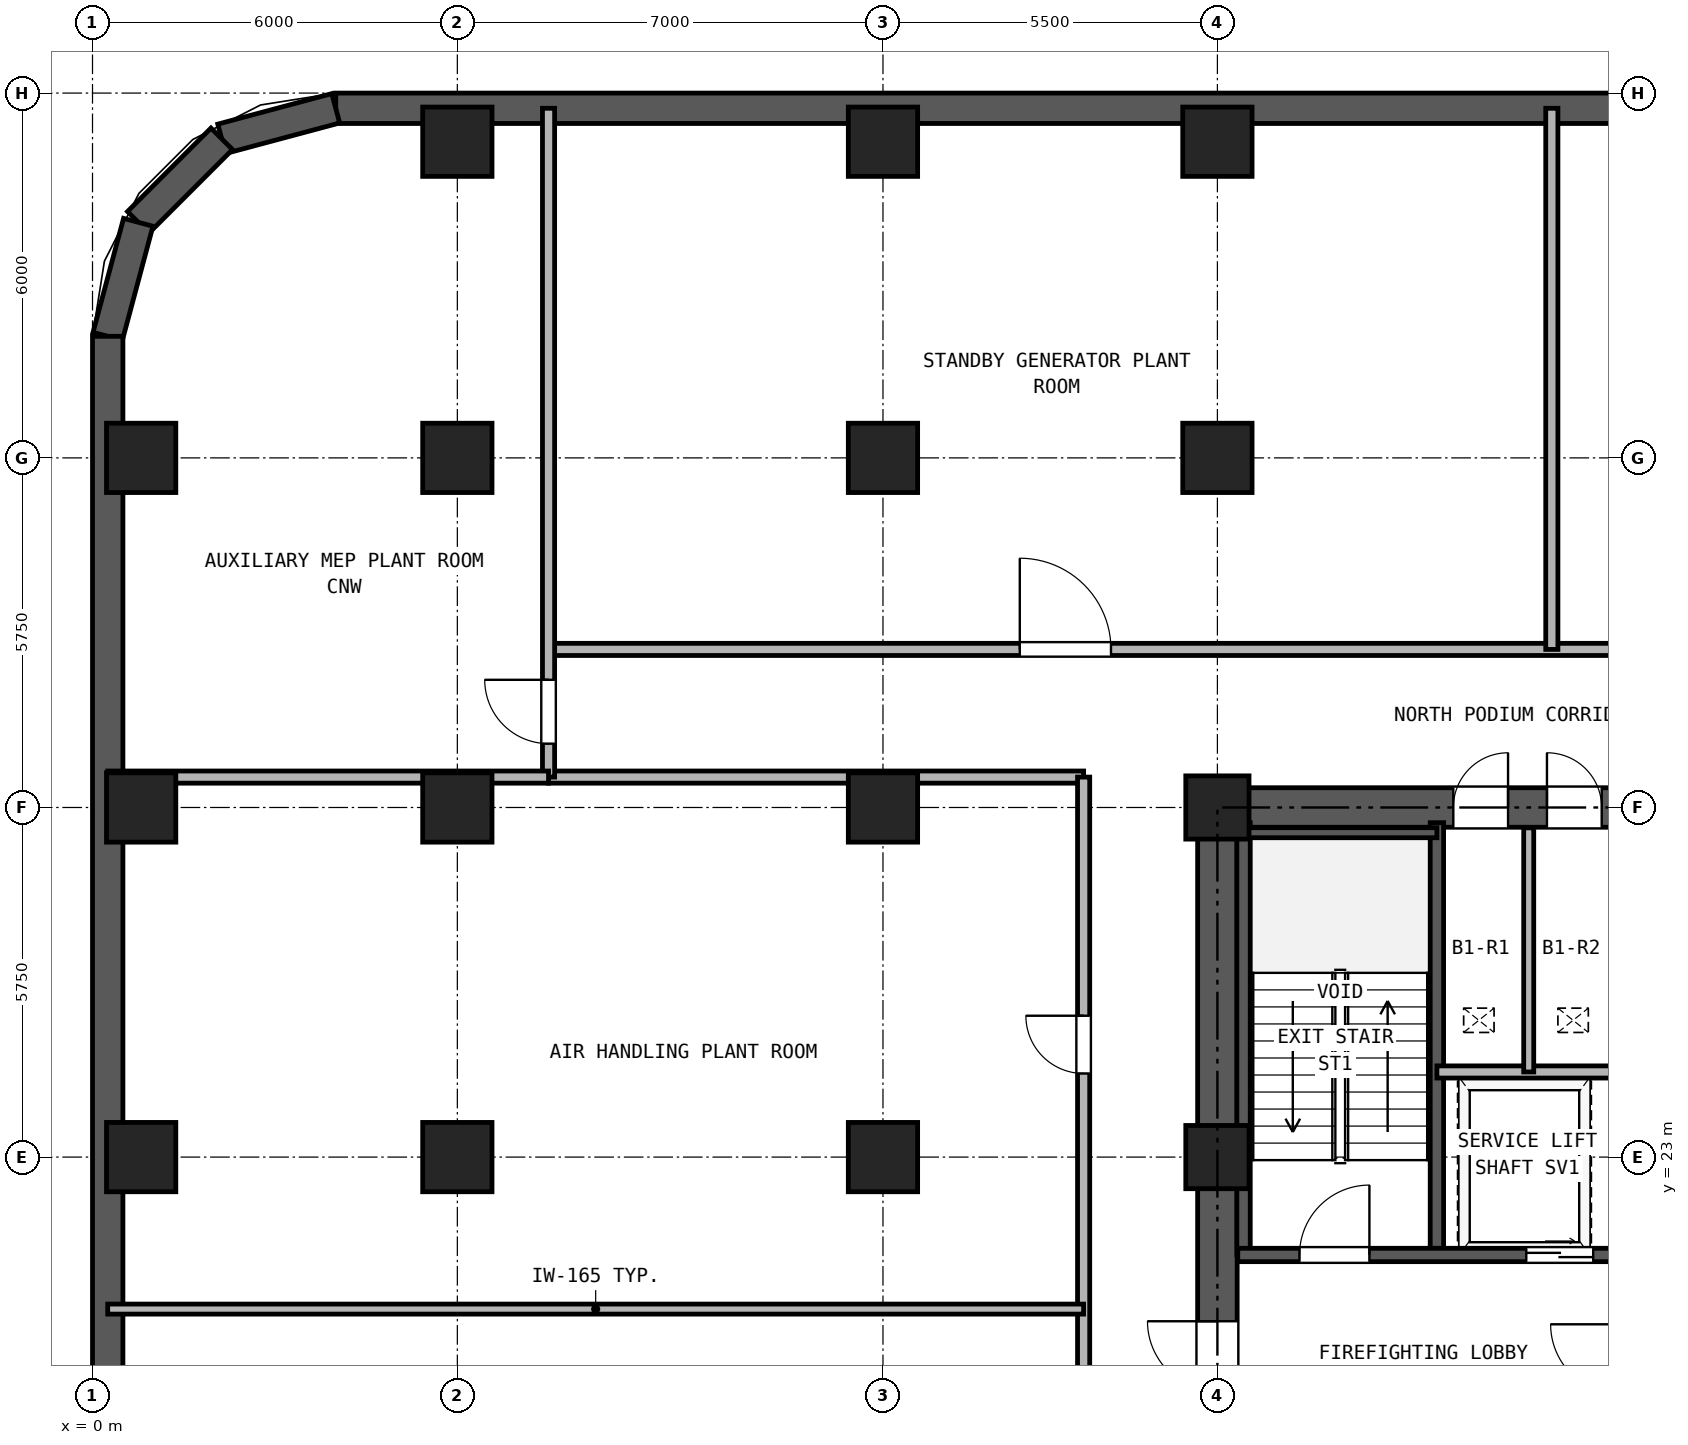
"""IFC4 building model, lengths in metres.
Left out: names, types, materials, properties, quantities, classifications, styles, units other than length and angle.
Written with IfcOpenShell. Run it as: python <this file> out.ifc"""

import sys

from ifc_helpers import new_model, si_unit, direction, frame, frame_2d, origin, origin_2d, place, context, subcontext, project, spatial, rectangle, hollow_rectangle, extrude, source, transform, mapped, element, fill, save


model = new_model("IFC4")
c1 = context("Model", 3, precision=1e-05, world=origin(), true_north=direction((0.0, 1.0)))
c2 = subcontext(c1, "Body", "Model", "MODEL_VIEW")
j1 = project(units=[si_unit("LENGTHUNIT", "METRE"), si_unit("PLANEANGLEUNIT", "RADIAN")], contexts=[c1])
p1 = place(None, origin())
s1 = spatial("IfcSite", under=j1, at=p1, CompositionType="ELEMENT")
p2 = place(p1, origin())
s2 = spatial("IfcBuilding", under=s1, at=p2, CompositionType="ELEMENT")
p3 = place(p2, frame((0.0, 0.0, -4.2)))
s3 = spatial("IfcBuildingStorey", under=s2, at=p3, CompositionType="ELEMENT", Elevation=-4.2)
m1 = source(origin(), c2, "Body", "SweptSolid", [
    extrude(hollow_rectangle(XDim=1.14, YDim=1.14, WallThickness=0.07, at=origin_2d()), origin(), (0.0, 0.0, 1.0), 3.88),
])
for number, where, z_axis, x_axis in (
    (1, (6.0, 39.7, 0.0), (0.0, 0.0, 1.0), (1.0, 0.0, 0.0)),
    (2, (13.0, 39.7, 0.0), (0.0, 0.0, 1.0), (1.0, 0.0, 0.0)),
    (3, (18.5, 39.7, 0.0), (0.0, 0.0, 1.0), (1.0, 0.0, 0.0)),
    (4, (0.8, 23.0, 0.0), (0.0, 0.0, 1.0), (1.0, 0.0, 0.0)),
    (5, (0.8, 28.75, 0.0), (0.0, 0.0, 1.0), (1.0, 0.0, 0.0)),
    (6, (0.8, 34.5, 0.0), (0.0, 0.0, 1.0), (1.0, 0.0, 0.0)),
    (7, (6.0, 23.0, 0.0), (0.0, 0.0, 1.0), (1.0, 0.0, 0.0)),
    (8, (6.0, 28.75, 0.0), (0.0, 0.0, 1.0), (1.0, 0.0, 0.0)),
    (9, (6.0, 34.5, 0.0), (0.0, 0.0, 1.0), (1.0, 0.0, 0.0)),
    (10, (13.0, 23.0, 0.0), (0.0, 0.0, 1.0), (1.0, 0.0, 0.0)),
    (11, (13.0, 28.75, 0.0), (0.0, 0.0, 1.0), (1.0, 0.0, 0.0)),
    (12, (13.0, 34.5, 0.0), (0.0, 0.0, 1.0), (1.0, 0.0, 0.0)),
):
    element("IfcColumn", number, at=place(p3, frame(where, z_axis=z_axis, x_axis=x_axis)), inside=s3, PredefinedType="COLUMN", context=c2, shape_type="MappedRepresentation", body=[
        mapped(m1, transform((0.0, 0.0, 0.0), x_axis=(1.0, 0.0, 0.0), y_axis=(0.0, 1.0, 0.0), z_axis=(0.0, 0.0, 1.0), scale=1.0)),
    ])
m2 = source(origin(), c2, "Body", "SweptSolid", [
    extrude(hollow_rectangle(XDim=1.04, YDim=1.04, WallThickness=0.065, at=origin_2d()), origin(), (0.0, 0.0, 1.0), 3.88),
])
for number, where, z_axis, x_axis in (
    (13, (18.5, 23.0, 0.0), (0.0, 0.0, 1.0), (1.0, 0.0, 0.0)),
    (14, (18.5, 28.75, 0.0), (0.0, 0.0, 1.0), (1.0, 0.0, 0.0)),
):
    element("IfcColumn", number, at=place(p3, frame(where, z_axis=z_axis, x_axis=x_axis)), inside=s3, PredefinedType="COLUMN", context=c2, shape_type="MappedRepresentation", body=[
        mapped(m2, transform((0.0, 0.0, 0.0), x_axis=(1.0, 0.0, 0.0), y_axis=(0.0, 1.0, 0.0), z_axis=(0.0, 0.0, 1.0), scale=1.0)),
    ])
p4 = place(p3, frame((18.5, 34.5, 0.0), z_axis=(0.0, 0.0, 1.0), x_axis=(1.0, 0.0, 0.0)))
e15 = element("IfcColumn", 15, at=p4, inside=s3, PredefinedType="COLUMN", context=c2, shape_type="MappedRepresentation", body=[
    mapped(m1, transform((0.0, 0.0, 0.0), x_axis=(1.0, 0.0, 0.0), y_axis=(0.0, 1.0, 0.0), z_axis=(0.0, 0.0, 1.0), scale=1.0)),
])
p5 = place(p3, frame((43.0, 40.25, 0.0), z_axis=(0.0, 0.0, 1.0), x_axis=(-1.0, 0.0, 0.0)))
e16 = element("IfcWall", 16, at=p5, inside=s3, PredefinedType="USERDEFINED", context=c2, shape_type="SweptSolid", body=[
    extrude(rectangle(XDim=39.0, YDim=0.5, at=frame_2d((19.5, 0.0))), origin(), (0.0, 0.0, 1.0), 3.88),
])
for number, where, z_axis, x_axis in (
    (17, (4.0, 40.25, 0.0), (0.0, 0.0, 1.0), (-0.966, -0.259, 0.0)),
    (18, (2.125, 39.748, 0.0), (0.0, 0.0, 1.0), (-0.707, -0.707, 0.0)),
    (19, (0.752, 38.375, 0.0), (0.0, 0.0, 1.0), (-0.259, -0.966, 0.0)),
):
    element("IfcWall", number, at=place(p3, frame(where, z_axis=z_axis, x_axis=x_axis)), inside=s3, PredefinedType="USERDEFINED", context=c2, shape_type="SweptSolid", body=[
        extrude(rectangle(XDim=1.941, YDim=0.5, at=frame_2d((0.971, 0.0))), origin(), (0.0, 0.0, 1.0), 3.88),
    ])
p6 = place(p3, frame((0.25, 36.5, 0.0), z_axis=(0.0, 0.0, 1.0), x_axis=(0.0, -1.0, 0.0)))
e20 = element("IfcWall", 20, at=p6, inside=s3, PredefinedType="USERDEFINED", context=c2, shape_type="SweptSolid", body=[
    extrude(rectangle(XDim=32.5, YDim=0.5, at=frame_2d((16.25, 0.0))), origin(), (0.0, 0.0, 1.0), 3.88),
])
p7 = place(p3, frame((18.175, 28.75, 0.0), z_axis=(0.0, 0.0, 1.0), x_axis=(1.0, 0.0, 0.0)))
e21 = element("IfcWall", 21, at=p7, inside=s3, PredefinedType="SHEAR", context=c2, shape_type="SweptSolid", body=[
    extrude(rectangle(XDim=10.65, YDim=0.65, at=frame_2d((5.325, 0.0))), origin(), (0.0, 0.0, 1.0), 3.88),
])
p8 = place(p7, frame((4.205, 0.0, 0.0)))
e22 = element("IfcOpeningElement", 22, at=p8, cuts=e21, PredefinedType="OPENING", context=c2, shape_type="SweptSolid", body=[
    extrude(rectangle(XDim=0.9, YDim=2.05, at=frame_2d((0.45, 1.025))), frame((0.0, 0.335, 0.0), z_axis=(0.0, -1.0, 0.0), x_axis=(1.0, 0.0, 0.0)), (0.0, 0.0, 1.0), 0.67),
])
p9 = place(p7, frame((5.745, 0.0, 0.0)))
e23 = element("IfcOpeningElement", 23, at=p9, cuts=e21, PredefinedType="OPENING", context=c2, shape_type="SweptSolid", body=[
    extrude(rectangle(XDim=0.9, YDim=2.05, at=frame_2d((0.45, 1.025))), frame((0.0, 0.335, 0.0), z_axis=(0.0, -1.0, 0.0), x_axis=(1.0, 0.0, 0.0)), (0.0, 0.0, 1.0), 0.67),
])
p10 = place(p3, frame((18.5, 11.825, 0.0), z_axis=(0.0, 0.0, 1.0), x_axis=(0.0, 1.0, 0.0)))
e24 = element("IfcWall", 24, at=p10, inside=s3, PredefinedType="SHEAR", context=c2, shape_type="SweptSolid", body=[
    extrude(rectangle(XDim=16.6, YDim=0.65, at=frame_2d((8.3, 0.0))), origin(), (0.0, 0.0, 1.0), 3.88),
])
p11 = place(p10, frame((7.325, 0.0, 0.0)))
e25 = element("IfcOpeningElement", 25, at=p11, cuts=e24, PredefinedType="OPENING", context=c2, shape_type="SweptSolid", body=[
    extrude(rectangle(XDim=1.15, YDim=2.2, at=frame_2d((0.575, 1.1))), frame((0.0, 0.335, 0.0), z_axis=(0.0, -1.0, 0.0), x_axis=(1.0, 0.0, 0.0)), (0.0, 0.0, 1.0), 0.67),
])
for number, where, z_axis, x_axis in (
    (26, (18.93, 21.39, 0.0), (0.0, 0.0, 1.0), (0.0, 1.0, 0.0)),
    (27, (22.11, 21.39, 0.0), (0.0, 0.0, 1.0), (0.0, 1.0, 0.0)),
):
    element("IfcWall", number, at=place(p3, frame(where, z_axis=z_axis, x_axis=x_axis)), inside=s3, PredefinedType="SOLIDWALL", context=c2, shape_type="SweptSolid", body=[
        extrude(rectangle(XDim=7.11, YDim=0.22, at=frame_2d((3.555, 0.0))), origin(), (0.0, 0.0, 1.0), 3.88),
    ])
p12 = place(p3, frame((18.835, 28.335, 0.0), z_axis=(0.0, 0.0, 1.0), x_axis=(1.0, 0.0, 0.0)))
e28 = element("IfcWall", 28, at=p12, inside=s3, PredefinedType="PARTITIONING", context=c2, shape_type="SweptSolid", body=[
    extrude(rectangle(XDim=3.275, YDim=0.165, at=frame_2d((1.638, 0.0))), origin(), (0.0, 0.0, 1.0), 3.88),
])
p13 = place(p3, frame((18.835, 21.39, 0.0), z_axis=(0.0, 0.0, 1.0), x_axis=(1.0, 0.0, 0.0)))
e29 = element("IfcWall", 29, at=p13, inside=s3, PredefinedType="SOLIDWALL", context=c2, shape_type="SweptSolid", body=[
    extrude(rectangle(XDim=6.295, YDim=0.22, at=frame_2d((3.147, 0.0))), origin(), (0.0, 0.0, 1.0), 3.88),
])
p14 = place(p13, frame((1.015, 0.0, 0.0)))
e30 = element("IfcOpeningElement", 30, at=p14, cuts=e29, PredefinedType="OPENING", context=c2, shape_type="SweptSolid", body=[
    extrude(rectangle(XDim=1.15, YDim=2.2, at=frame_2d((0.575, 1.1))), frame((0.0, 0.12, 0.0), z_axis=(0.0, -1.0, 0.0), x_axis=(1.0, 0.0, 0.0)), (0.0, 0.0, 1.0), 0.24),
])
p15 = place(p13, frame((4.745, 0.0, 0.0)))
e31 = element("IfcOpeningElement", 31, at=p15, cuts=e29, PredefinedType="OPENING", context=c2, shape_type="SweptSolid", body=[
    extrude(rectangle(XDim=1.1, YDim=2.25, at=frame_2d((0.55, 1.125))), frame((0.0, 0.12, 0.0), z_axis=(0.0, -1.0, 0.0), x_axis=(1.0, 0.0, 0.0)), (0.0, 0.0, 1.0), 0.24),
])
p16 = place(p3, frame((22.11, 24.4, 0.0), z_axis=(0.0, 0.0, 1.0), x_axis=(1.0, 0.0, 0.0)))
e32 = element("IfcWall", 32, at=p16, inside=s3, PredefinedType="PARTITIONING", context=c2, shape_type="SweptSolid", body=[
    extrude(rectangle(XDim=3.02, YDim=0.2, at=frame_2d((1.51, 0.0))), origin(), (0.0, 0.0, 1.0), 3.88),
])
p17 = place(p3, frame((23.62, 24.4, 0.0), z_axis=(0.0, 0.0, 1.0), x_axis=(0.0, 1.0, 0.0)))
e33 = element("IfcWall", 33, at=p17, inside=s3, PredefinedType="PARTITIONING", context=c2, shape_type="SweptSolid", body=[
    extrude(rectangle(XDim=4.015, YDim=0.165, at=frame_2d((2.008, 0.0))), origin(), (0.0, 0.0, 1.0), 3.88),
])
p18 = place(p3, frame((7.5, 31.35, 0.0), z_axis=(0.0, 0.0, 1.0), x_axis=(1.0, 0.0, 0.0)))
e34 = element("IfcWall", 34, at=p18, inside=s3, PredefinedType="PARTITIONING", context=c2, shape_type="SweptSolid", body=[
    extrude(rectangle(XDim=32.0, YDim=0.2, at=frame_2d((16.0, 0.0))), origin(), (0.0, 0.0, 1.0), 3.88),
])
p19 = place(p18, frame((7.75, 0.0, 0.0)))
e35 = element("IfcOpeningElement", 35, at=p19, cuts=e34, PredefinedType="OPENING", context=c2, shape_type="SweptSolid", body=[
    extrude(rectangle(XDim=1.5, YDim=2.25, at=frame_2d((0.75, 1.125))), frame((0.0, 0.11, 0.0), z_axis=(0.0, -1.0, 0.0), x_axis=(1.0, 0.0, 0.0)), (0.0, 0.0, 1.0), 0.22),
])
p20 = place(p18, frame((23.75, 0.0, 0.0)))
e36 = element("IfcOpeningElement", 36, at=p20, cuts=e34, PredefinedType="OPENING", context=c2, shape_type="SweptSolid", body=[
    extrude(rectangle(XDim=1.5, YDim=2.25, at=frame_2d((0.75, 1.125))), frame((0.0, 0.11, 0.0), z_axis=(0.0, -1.0, 0.0), x_axis=(1.0, 0.0, 0.0)), (0.0, 0.0, 1.0), 0.22),
])
p21 = place(p3, frame((7.5, 29.25, 0.0), z_axis=(0.0, 0.0, 1.0), x_axis=(1.0, 0.0, 0.0)))
e37 = element("IfcWall", 37, at=p21, inside=s3, PredefinedType="PARTITIONING", context=c2, shape_type="SweptSolid", body=[
    extrude(rectangle(XDim=8.8, YDim=0.2, at=frame_2d((4.4, 0.0))), origin(), (0.0, 0.0, 1.0), 3.88),
])
p22 = place(p3, frame((16.3, 11.0, 0.0), z_axis=(0.0, 0.0, 1.0), x_axis=(0.0, 1.0, 0.0)))
e38 = element("IfcWall", 38, at=p22, inside=s3, PredefinedType="PARTITIONING", context=c2, shape_type="SweptSolid", body=[
    extrude(rectangle(XDim=18.25, YDim=0.2, at=frame_2d((9.125, 0.0))), origin(), (0.0, 0.0, 1.0), 3.88),
])
p23 = place(p22, frame((4.25, 0.0, 0.0)))
e39 = element("IfcOpeningElement", 39, at=p23, cuts=e38, PredefinedType="OPENING", context=c2, shape_type="SweptSolid", body=[
    extrude(rectangle(XDim=0.95, YDim=2.15, at=frame_2d((0.475, 1.075))), frame((0.0, 0.11, 0.0), z_axis=(0.0, -1.0, 0.0), x_axis=(1.0, 0.0, 0.0)), (0.0, 0.0, 1.0), 0.22),
])
p24 = place(p22, frame((13.375, 0.0, 0.0)))
e40 = element("IfcOpeningElement", 40, at=p24, cuts=e38, PredefinedType="OPENING", context=c2, shape_type="SweptSolid", body=[
    extrude(rectangle(XDim=0.95, YDim=2.15, at=frame_2d((0.475, 1.075))), frame((0.0, 0.11, 0.0), z_axis=(0.0, -1.0, 0.0), x_axis=(1.0, 0.0, 0.0)), (0.0, 0.0, 1.0), 0.22),
])
p25 = place(p3, frame((7.5, 29.25, 0.0), z_axis=(0.0, 0.0, 1.0), x_axis=(0.0, 1.0, 0.0)))
e41 = element("IfcWall", 41, at=p25, inside=s3, PredefinedType="PARTITIONING", context=c2, shape_type="SweptSolid", body=[
    extrude(rectangle(XDim=11.0, YDim=0.2, at=frame_2d((5.5, 0.0))), origin(), (0.0, 0.0, 1.0), 3.88),
])
p26 = place(p25, frame((0.55, 0.0, 0.0)))
e42 = element("IfcOpeningElement", 42, at=p26, cuts=e41, PredefinedType="OPENING", context=c2, shape_type="SweptSolid", body=[
    extrude(rectangle(XDim=1.05, YDim=2.15, at=frame_2d((0.525, 1.075))), frame((0.0, 0.11, 0.0), z_axis=(0.0, -1.0, 0.0), x_axis=(1.0, 0.0, 0.0)), (0.0, 0.0, 1.0), 0.22),
])
p27 = place(p3, frame((0.25, 29.25, 0.0), z_axis=(0.0, 0.0, 1.0), x_axis=(1.0, 0.0, 0.0)))
e43 = element("IfcWall", 43, at=p27, inside=s3, PredefinedType="PARTITIONING", context=c2, shape_type="SweptSolid", body=[
    extrude(rectangle(XDim=7.25, YDim=0.2, at=frame_2d((3.625, 0.0))), origin(), (0.0, 0.0, 1.0), 3.88),
])
p28 = place(p3, frame((24.0, 31.35, 0.0), z_axis=(0.0, 0.0, 1.0), x_axis=(0.0, 1.0, 0.0)))
e44 = element("IfcWall", 44, at=p28, inside=s3, PredefinedType="PARTITIONING", context=c2, shape_type="SweptSolid", body=[
    extrude(rectangle(XDim=8.9, YDim=0.2, at=frame_2d((4.45, 0.0))), origin(), (0.0, 0.0, 1.0), 3.88),
])
p29 = place(p3, frame((0.25, 20.5, 0.0), z_axis=(0.0, 0.0, 1.0), x_axis=(1.0, 0.0, 0.0)))
e45 = element("IfcWall", 45, at=p29, inside=s3, PredefinedType="PARTITIONING", context=c2, shape_type="SweptSolid", body=[
    extrude(rectangle(XDim=16.05, YDim=0.165, at=frame_2d((8.025, 0.0))), origin(), (0.0, 0.0, 1.0), 3.88),
])
p30 = place(p14, frame((1.15, 0.0, 0.0), z_axis=(0.0, 0.0, 1.0), x_axis=(-1.0, 0.0, 0.0)))
e46 = element("IfcDoor", 46, at=p30, inside=s3, OperationType="SINGLE_SWING_RIGHT", PredefinedType="DOOR", context=c2, shape_type="SweptSolid", body=[
    extrude(rectangle(XDim=1.15, YDim=2.2, at=frame_2d((0.575, 1.1))), frame((0.0, 0.025, 0.0), z_axis=(0.0, -1.0, 0.0), x_axis=(1.0, 0.0, 0.0)), (0.0, 0.0, 1.0), 0.05),
])
fill(e30, e46)
p31 = place(p15, frame((1.1, 0.0, 0.0), z_axis=(0.0, 0.0, 1.0), x_axis=(-1.0, 0.0, 0.0)))
e47 = element("IfcDoor", 47, at=p31, inside=s3, OperationType="DOUBLE_DOOR_SLIDING", PredefinedType="DOOR", context=c2, shape_type="SweptSolid", body=[
    extrude(rectangle(XDim=1.1, YDim=2.25, at=frame_2d((0.55, 1.125))), frame((0.0, 0.025, 0.0), z_axis=(0.0, -1.0, 0.0), x_axis=(1.0, 0.0, 0.0)), (0.0, 0.0, 1.0), 0.05),
])
fill(e31, e47)
p32 = place(p11, frame((1.15, 0.0, 0.0), z_axis=(0.0, 0.0, 1.0), x_axis=(-1.0, 0.0, 0.0)))
e48 = element("IfcDoor", 48, at=p32, inside=s3, OperationType="SINGLE_SWING_RIGHT", PredefinedType="DOOR", context=c2, shape_type="SweptSolid", body=[
    extrude(rectangle(XDim=1.15, YDim=2.2, at=frame_2d((0.575, 1.1))), frame((0.0, 0.025, 0.0), z_axis=(0.0, -1.0, 0.0), x_axis=(1.0, 0.0, 0.0)), (0.0, 0.0, 1.0), 0.05),
])
fill(e25, e48)
p33 = place(p8, origin())
e49 = element("IfcDoor", 49, at=p33, inside=s3, OperationType="SINGLE_SWING_RIGHT", PredefinedType="DOOR", context=c2, shape_type="SweptSolid", body=[
    extrude(rectangle(XDim=0.9, YDim=2.05, at=frame_2d((0.45, 1.025))), frame((0.0, 0.025, 0.0), z_axis=(0.0, -1.0, 0.0), x_axis=(1.0, 0.0, 0.0)), (0.0, 0.0, 1.0), 0.05),
])
fill(e22, e49)
p34 = place(p9, origin())
e50 = element("IfcDoor", 50, at=p34, inside=s3, OperationType="SINGLE_SWING_LEFT", PredefinedType="DOOR", context=c2, shape_type="SweptSolid", body=[
    extrude(rectangle(XDim=0.9, YDim=2.05, at=frame_2d((0.45, 1.025))), frame((0.0, 0.025, 0.0), z_axis=(0.0, -1.0, 0.0), x_axis=(1.0, 0.0, 0.0)), (0.0, 0.0, 1.0), 0.05),
])
fill(e23, e50)
p35 = place(p19, origin())
e51 = element("IfcDoor", 51, at=p35, inside=s3, OperationType="SINGLE_SWING_LEFT", PredefinedType="DOOR", context=c2, shape_type="SweptSolid", body=[
    extrude(rectangle(XDim=1.5, YDim=2.25, at=frame_2d((0.75, 1.125))), frame((0.0, 0.025, 0.0), z_axis=(0.0, -1.0, 0.0), x_axis=(1.0, 0.0, 0.0)), (0.0, 0.0, 1.0), 0.05),
])
fill(e35, e51)
p36 = place(p26, frame((1.05, 0.0, 0.0), z_axis=(0.0, 0.0, 1.0), x_axis=(-1.0, 0.0, 0.0)))
e52 = element("IfcDoor", 52, at=p36, inside=s3, OperationType="SINGLE_SWING_RIGHT", PredefinedType="DOOR", context=c2, shape_type="SweptSolid", body=[
    extrude(rectangle(XDim=1.05, YDim=2.15, at=frame_2d((0.525, 1.075))), frame((0.0, 0.025, 0.0), z_axis=(0.0, -1.0, 0.0), x_axis=(1.0, 0.0, 0.0)), (0.0, 0.0, 1.0), 0.05),
])
fill(e42, e52)
p37 = place(p24, frame((0.95, 0.0, 0.0), z_axis=(0.0, 0.0, 1.0), x_axis=(-1.0, 0.0, 0.0)))
e53 = element("IfcDoor", 53, at=p37, inside=s3, OperationType="SINGLE_SWING_RIGHT", PredefinedType="DOOR", context=c2, shape_type="SweptSolid", body=[
    extrude(rectangle(XDim=0.95, YDim=2.15, at=frame_2d((0.475, 1.075))), frame((0.0, 0.025, 0.0), z_axis=(0.0, -1.0, 0.0), x_axis=(1.0, 0.0, 0.0)), (0.0, 0.0, 1.0), 0.05),
])
fill(e40, e53)
save(model, sys.argv[1])
